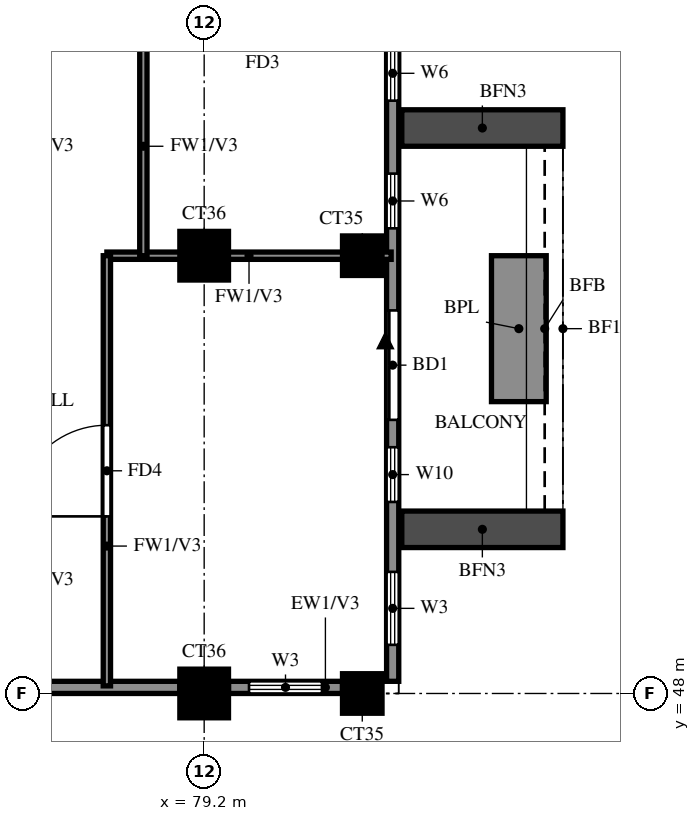
"""IFC4 building model, lengths in metres.
Left out: names, types, materials, properties, quantities, classifications, styles, units other than length and angle.
Written with IfcOpenShell. Run it as: python <this file> out.ifc"""

import sys

from ifc_helpers import new_model, si_unit, direction, frame, frame_2d, origin, origin_2d, place, context, subcontext, project, spatial, rectangle, extrude, source, transform, mapped, element, fill, save


model = new_model("IFC4")
c1 = context("Model", 3, precision=1e-05, world=origin(), true_north=direction((0.0, 1.0)))
c2 = subcontext(c1, "Body", "Model", "MODEL_VIEW")
j1 = project(units=[si_unit("LENGTHUNIT", "METRE"), si_unit("PLANEANGLEUNIT", "RADIAN")], contexts=[c1])
p1 = place(None, origin())
s1 = spatial("IfcSite", under=j1, at=p1, CompositionType="ELEMENT")
p2 = place(p1, origin())
s2 = spatial("IfcBuilding", under=s1, at=p2, CompositionType="ELEMENT")
p3 = place(p2, frame((0.0, 0.0, 232.5)))
s3 = spatial("IfcBuildingStorey", under=s2, at=p3, CompositionType="ELEMENT", Elevation=232.5)
m1 = source(origin(), c2, "Body", "SweptSolid", [
    extrude(rectangle(XDim=0.8, YDim=0.8, at=origin_2d()), origin(), (0.0, 0.0, 1.0), 3.22),
])
p4 = place(p3, frame((79.2, 48.0, 0.0), z_axis=(0.0, 0.0, 1.0), x_axis=(1.0, 0.0, 0.0)))
e1 = element("IfcColumn", 1, at=p4, inside=s3, PredefinedType="COLUMN", context=c2, shape_type="MappedRepresentation", body=[
    mapped(m1, transform((0.0, 0.0, 0.0))),
])
m2 = source(origin(), c2, "Body", "SweptSolid", [
    extrude(rectangle(XDim=0.65, YDim=0.65, at=origin_2d()), origin(), (0.0, 0.0, 1.0), 3.22),
])
p5 = place(p3, frame((81.8, 48.0, 0.0), z_axis=(0.0, 0.0, 1.0), x_axis=(1.0, 0.0, 0.0)))
e2 = element("IfcColumn", 2, at=p5, inside=s3, PredefinedType="COLUMN", context=c2, shape_type="MappedRepresentation", body=[
    mapped(m2, transform((0.0, 0.0, 0.0))),
])
p6 = place(p3, frame((79.2, 55.2, 0.0), z_axis=(0.0, 0.0, 1.0), x_axis=(1.0, 0.0, 0.0)))
e3 = element("IfcColumn", 3, at=p6, inside=s3, PredefinedType="COLUMN", context=c2, shape_type="MappedRepresentation", body=[
    mapped(m1, transform((0.0, 0.0, 0.0))),
])
p7 = place(p3, frame((81.8, 55.2, 0.0), z_axis=(0.0, 0.0, 1.0), x_axis=(1.0, 0.0, 0.0)))
e4 = element("IfcColumn", 4, at=p7, inside=s3, PredefinedType="COLUMN", context=c2, shape_type="MappedRepresentation", body=[
    mapped(m2, transform((0.0, 0.0, 0.0))),
])
p8 = place(p3, frame((81.907, 39.87, 0.0), z_axis=(0.0, 0.0, 1.0), x_axis=(-0.777936274417, 0.62834318087, 0.0)))
e5 = element("IfcWall", 5, at=p8, inside=s3, PredefinedType="SOLIDWALL", context=c2, shape_type="SweptSolid", body=[
    extrude(rectangle(XDim=13.099, YDim=0.2, at=frame_2d((6.549, 0.0))), origin(), (0.0, 0.0, 1.0), 3.22),
])
p9 = place(p8, frame((9.938, 0.0, 1.5)))
e6 = element("IfcOpeningElement", 6, at=p9, cuts=e5, PredefinedType="OPENING", context=c2, shape_type="SweptSolid", body=[
    extrude(rectangle(XDim=0.9, YDim=0.9, at=frame_2d((0.45, 0.45))), frame((0.0, 0.11, 0.0), z_axis=(0.0, -1.0, 0.0), x_axis=(1.0, 0.0, 0.0)), (0.0, 0.0, 1.0), 0.22),
])
p10 = place(p3, frame((71.987, 48.1, 0.0), z_axis=(0.0, 0.0, 1.0), x_axis=(1.0, 0.0, 0.0)))
e7 = element("IfcWall", 7, at=p10, inside=s3, PredefinedType="SOLIDWALL", context=c2, shape_type="SweptSolid", body=[
    extrude(rectangle(XDim=6.813, YDim=0.2, at=frame_2d((3.406, 0.0))), origin(), (0.0, 0.0, 1.0), 3.22),
])
p11 = place(p3, frame((79.6, 48.1, 0.0), z_axis=(0.0, 0.0, 1.0), x_axis=(1.0, 0.0, 0.0)))
e8 = element("IfcWall", 8, at=p11, inside=s3, PredefinedType="SOLIDWALL", context=c2, shape_type="SweptSolid", body=[
    extrude(rectangle(XDim=1.875, YDim=0.2, at=frame_2d((0.938, 0.0))), origin(), (0.0, 0.0, 1.0), 3.22),
])
p12 = place(p11, frame((0.337, 0.0, 0.6)))
e9 = element("IfcOpeningElement", 9, at=p12, cuts=e8, PredefinedType="OPENING", context=c2, shape_type="SweptSolid", body=[
    extrude(rectangle(XDim=1.2, YDim=2.4, at=frame_2d((0.6, 1.2))), frame((0.0, 0.11, 0.0), z_axis=(0.0, -1.0, 0.0), x_axis=(1.0, 0.0, 0.0)), (0.0, 0.0, 1.0), 0.22),
])
p13 = place(p3, frame((82.3, 48.2, 0.0), z_axis=(0.0, 0.0, 1.0), x_axis=(0.0, 1.0, 0.0)))
e10 = element("IfcWall", 10, at=p13, inside=s3, PredefinedType="SOLIDWALL", context=c2, shape_type="SweptSolid", body=[
    extrude(rectangle(XDim=28.6, YDim=0.2, at=frame_2d((14.3, 0.0))), origin(), (0.0, 0.0, 1.0), 3.22),
])
p14 = place(p13, frame((4.3, 0.0, 0.0)))
e11 = element("IfcOpeningElement", 11, at=p14, cuts=e10, PredefinedType="OPENING", context=c2, shape_type="SweptSolid", body=[
    extrude(rectangle(XDim=1.8, YDim=2.4, at=frame_2d((0.9, 1.2))), frame((0.0, 0.11, 0.0), z_axis=(0.0, -1.0, 0.0), x_axis=(1.0, 0.0, 0.0)), (0.0, 0.0, 1.0), 0.22),
])
p15 = place(p13, frame((0.6, 0.0, 0.6)))
e12 = element("IfcOpeningElement", 12, at=p15, cuts=e10, PredefinedType="OPENING", context=c2, shape_type="SweptSolid", body=[
    extrude(rectangle(XDim=1.2, YDim=2.4, at=frame_2d((0.6, 1.2))), frame((0.0, 0.11, 0.0), z_axis=(0.0, -1.0, 0.0), x_axis=(1.0, 0.0, 0.0)), (0.0, 0.0, 1.0), 0.22),
])
p16 = place(p13, frame((2.95, 0.0, 0.6)))
e13 = element("IfcOpeningElement", 13, at=p16, cuts=e10, PredefinedType="OPENING", context=c2, shape_type="SweptSolid", body=[
    extrude(rectangle(XDim=0.9, YDim=2.4, at=frame_2d((0.45, 1.2))), frame((0.0, 0.11, 0.0), z_axis=(0.0, -1.0, 0.0), x_axis=(1.0, 0.0, 0.0)), (0.0, 0.0, 1.0), 0.22),
])
p17 = place(p13, frame((11.2, 0.0, 0.6)))
e14 = element("IfcOpeningElement", 14, at=p17, cuts=e10, PredefinedType="OPENING", context=c2, shape_type="SweptSolid", body=[
    extrude(rectangle(XDim=2.4, YDim=2.4, at=frame_2d((1.2, 1.2))), frame((0.0, 0.11, 0.0), z_axis=(0.0, -1.0, 0.0), x_axis=(1.0, 0.0, 0.0)), (0.0, 0.0, 1.0), 0.22),
])
p18 = place(p13, frame((7.45, 0.0, 1.5)))
e15 = element("IfcOpeningElement", 15, at=p18, cuts=e10, PredefinedType="OPENING", context=c2, shape_type="SweptSolid", body=[
    extrude(rectangle(XDim=0.9, YDim=0.9, at=frame_2d((0.45, 0.45))), frame((0.0, 0.11, 0.0), z_axis=(0.0, -1.0, 0.0), x_axis=(1.0, 0.0, 0.0)), (0.0, 0.0, 1.0), 0.22),
])
p19 = place(p13, frame((9.55, 0.0, 1.5)))
e16 = element("IfcOpeningElement", 16, at=p19, cuts=e10, PredefinedType="OPENING", context=c2, shape_type="SweptSolid", body=[
    extrude(rectangle(XDim=0.9, YDim=0.9, at=frame_2d((0.45, 0.45))), frame((0.0, 0.11, 0.0), z_axis=(0.0, -1.0, 0.0), x_axis=(1.0, 0.0, 0.0)), (0.0, 0.0, 1.0), 0.22),
])
p20 = place(p13, frame((14.8, 0.0, 0.6)))
e17 = element("IfcOpeningElement", 17, at=p20, cuts=e10, PredefinedType="OPENING", context=c2, shape_type="SweptSolid", body=[
    extrude(rectangle(XDim=2.4, YDim=2.4, at=frame_2d((1.2, 1.2))), frame((0.0, 0.11, 0.0), z_axis=(0.0, -1.0, 0.0), x_axis=(1.0, 0.0, 0.0)), (0.0, 0.0, 1.0), 0.22),
])
p21 = place(p13, frame((19.15, 0.0, 1.5)))
e18 = element("IfcOpeningElement", 18, at=p21, cuts=e10, PredefinedType="OPENING", context=c2, shape_type="SweptSolid", body=[
    extrude(rectangle(XDim=0.9, YDim=0.9, at=frame_2d((0.45, 0.45))), frame((0.0, 0.11, 0.0), z_axis=(0.0, -1.0, 0.0), x_axis=(1.0, 0.0, 0.0)), (0.0, 0.0, 1.0), 0.22),
])
p22 = place(p13, frame((22.0, 0.0, 0.6)))
e19 = element("IfcOpeningElement", 19, at=p22, cuts=e10, PredefinedType="OPENING", context=c2, shape_type="SweptSolid", body=[
    extrude(rectangle(XDim=2.4, YDim=2.4, at=frame_2d((1.2, 1.2))), frame((0.0, 0.11, 0.0), z_axis=(0.0, -1.0, 0.0), x_axis=(1.0, 0.0, 0.0)), (0.0, 0.0, 1.0), 0.22),
])
p23 = place(p13, frame((25.5, 0.0, 0.6)))
e20 = element("IfcOpeningElement", 20, at=p23, cuts=e10, PredefinedType="OPENING", context=c2, shape_type="SweptSolid", body=[
    extrude(rectangle(XDim=2.4, YDim=2.4, at=frame_2d((1.2, 1.2))), frame((0.0, 0.11, 0.0), z_axis=(0.0, -1.0, 0.0), x_axis=(1.0, 0.0, 0.0)), (0.0, 0.0, 1.0), 0.22),
])
for number, where, z_axis, x_axis in (
    (21, (82.45, 50.7, 0.0), (0.0, 0.0, 1.0), (1.0, 0.0, 0.0)),
    (22, (82.45, 57.3, 0.0), (0.0, 0.0, 1.0), (1.0, 0.0, 0.0)),
):
    element("IfcWall", number, at=place(p3, frame(where, z_axis=z_axis, x_axis=x_axis)), inside=s3, PredefinedType="SOLIDWALL", context=c2, shape_type="SweptSolid", body=[
        extrude(rectangle(XDim=2.65, YDim=0.6, at=frame_2d((1.325, 0.0))), origin(), (0.0, 0.0, 1.0), 2.85),
    ])
p24 = place(p3, frame((84.375, 52.8, 0.0), z_axis=(0.0, 0.0, 1.0), x_axis=(0.0, 1.0, 0.0)))
e23 = element("IfcWall", 23, at=p24, inside=s3, PredefinedType="SOLIDWALL", context=c2, shape_type="SweptSolid", body=[
    extrude(rectangle(XDim=2.4, YDim=0.9, at=frame_2d((1.2, 0.0))), origin(), (0.0, 0.0, 1.0), 0.9),
])
p25 = place(p3, frame((77.6, 55.2, 0.0), z_axis=(0.0, 0.0, 1.0), x_axis=(1.0, 0.0, 0.0)))
e24 = element("IfcWall", 24, at=p25, inside=s3, PredefinedType="PARTITIONING", context=c2, shape_type="SweptSolid", body=[
    extrude(rectangle(XDim=4.675, YDim=0.12, at=frame_2d((2.337, 0.0))), origin(), (0.0, 0.0, 1.0), 3.22),
])
p26 = place(p3, frame((77.6, 48.125, 0.0), z_axis=(0.0, 0.0, 1.0), x_axis=(0.0, 1.0, 0.0)))
e25 = element("IfcWall", 25, at=p26, inside=s3, PredefinedType="PARTITIONING", context=c2, shape_type="SweptSolid", body=[
    extrude(rectangle(XDim=7.075, YDim=0.12, at=frame_2d((3.538, 0.0))), origin(), (0.0, 0.0, 1.0), 3.22),
])
p27 = place(p26, frame((2.788, 0.0, 0.0)))
e26 = element("IfcOpeningElement", 26, at=p27, cuts=e25, PredefinedType="OPENING", context=c2, shape_type="SweptSolid", body=[
    extrude(rectangle(XDim=1.5, YDim=2.1, at=frame_2d((0.75, 1.05))), frame((0.0, 0.07, 0.0), z_axis=(0.0, -1.0, 0.0), x_axis=(1.0, 0.0, 0.0)), (0.0, 0.0, 1.0), 0.14),
])
p28 = place(p3, frame((78.2, 55.2, 0.0), z_axis=(0.0, 0.0, 1.0), x_axis=(0.0, 1.0, 0.0)))
e27 = element("IfcWall", 27, at=p28, inside=s3, PredefinedType="PARTITIONING", context=c2, shape_type="SweptSolid", body=[
    extrude(rectangle(XDim=3.6, YDim=0.12, at=frame_2d((1.8, 0.0))), origin(), (0.0, 0.0, 1.0), 3.22),
])
p29 = place(p12, origin())
e28 = element("IfcWindow", 28, at=p29, inside=s3, PartitioningType="SINGLE_PANEL", PredefinedType="WINDOW", context=c2, shape_type="SweptSolid", body=[
    extrude(rectangle(XDim=1.2, YDim=2.4, at=frame_2d((0.6, 1.2))), frame((0.0, 0.03, 0.0), z_axis=(0.0, -1.0, 0.0), x_axis=(1.0, 0.0, 0.0)), (0.0, 0.0, 1.0), 0.06),
])
fill(e9, e28)
p30 = place(p14, origin())
e29 = element("IfcDoor", 29, at=p30, inside=s3, OperationType="DOUBLE_DOOR_SLIDING", PredefinedType="DOOR", context=c2, shape_type="SweptSolid", body=[
    extrude(rectangle(XDim=1.8, YDim=2.4, at=frame_2d((0.9, 1.2))), frame((0.0, 0.025, 0.0), z_axis=(0.0, -1.0, 0.0), x_axis=(1.0, 0.0, 0.0)), (0.0, 0.0, 1.0), 0.05),
])
fill(e11, e29)
p31 = place(p15, origin())
e30 = element("IfcWindow", 30, at=p31, inside=s3, PartitioningType="SINGLE_PANEL", PredefinedType="WINDOW", context=c2, shape_type="SweptSolid", body=[
    extrude(rectangle(XDim=1.2, YDim=2.4, at=frame_2d((0.6, 1.2))), frame((0.0, 0.03, 0.0), z_axis=(0.0, -1.0, 0.0), x_axis=(1.0, 0.0, 0.0)), (0.0, 0.0, 1.0), 0.06),
])
fill(e12, e30)
p32 = place(p16, origin())
e31 = element("IfcWindow", 31, at=p32, inside=s3, PartitioningType="SINGLE_PANEL", PredefinedType="WINDOW", context=c2, shape_type="SweptSolid", body=[
    extrude(rectangle(XDim=0.9, YDim=2.4, at=frame_2d((0.45, 1.2))), frame((0.0, 0.03, 0.0), z_axis=(0.0, -1.0, 0.0), x_axis=(1.0, 0.0, 0.0)), (0.0, 0.0, 1.0), 0.06),
])
fill(e13, e31)
p33 = place(p18, origin())
e32 = element("IfcWindow", 32, at=p33, inside=s3, PartitioningType="SINGLE_PANEL", PredefinedType="WINDOW", context=c2, shape_type="SweptSolid", body=[
    extrude(rectangle(XDim=0.9, YDim=0.9, at=frame_2d((0.45, 0.45))), frame((0.0, 0.03, 0.0), z_axis=(0.0, -1.0, 0.0), x_axis=(1.0, 0.0, 0.0)), (0.0, 0.0, 1.0), 0.06),
])
fill(e15, e32)
p34 = place(p19, origin())
e33 = element("IfcWindow", 33, at=p34, inside=s3, PartitioningType="SINGLE_PANEL", PredefinedType="WINDOW", context=c2, shape_type="SweptSolid", body=[
    extrude(rectangle(XDim=0.9, YDim=0.9, at=frame_2d((0.45, 0.45))), frame((0.0, 0.03, 0.0), z_axis=(0.0, -1.0, 0.0), x_axis=(1.0, 0.0, 0.0)), (0.0, 0.0, 1.0), 0.06),
])
fill(e16, e33)
p35 = place(p27, origin())
e34 = element("IfcDoor", 34, at=p35, inside=s3, OperationType="SINGLE_SWING_LEFT", PredefinedType="DOOR", context=c2, shape_type="SweptSolid", body=[
    extrude(rectangle(XDim=1.5, YDim=2.1, at=frame_2d((0.75, 1.05))), frame((0.0, 0.025, 0.0), z_axis=(0.0, -1.0, 0.0), x_axis=(1.0, 0.0, 0.0)), (0.0, 0.0, 1.0), 0.05),
])
fill(e26, e34)
save(model, sys.argv[1])
